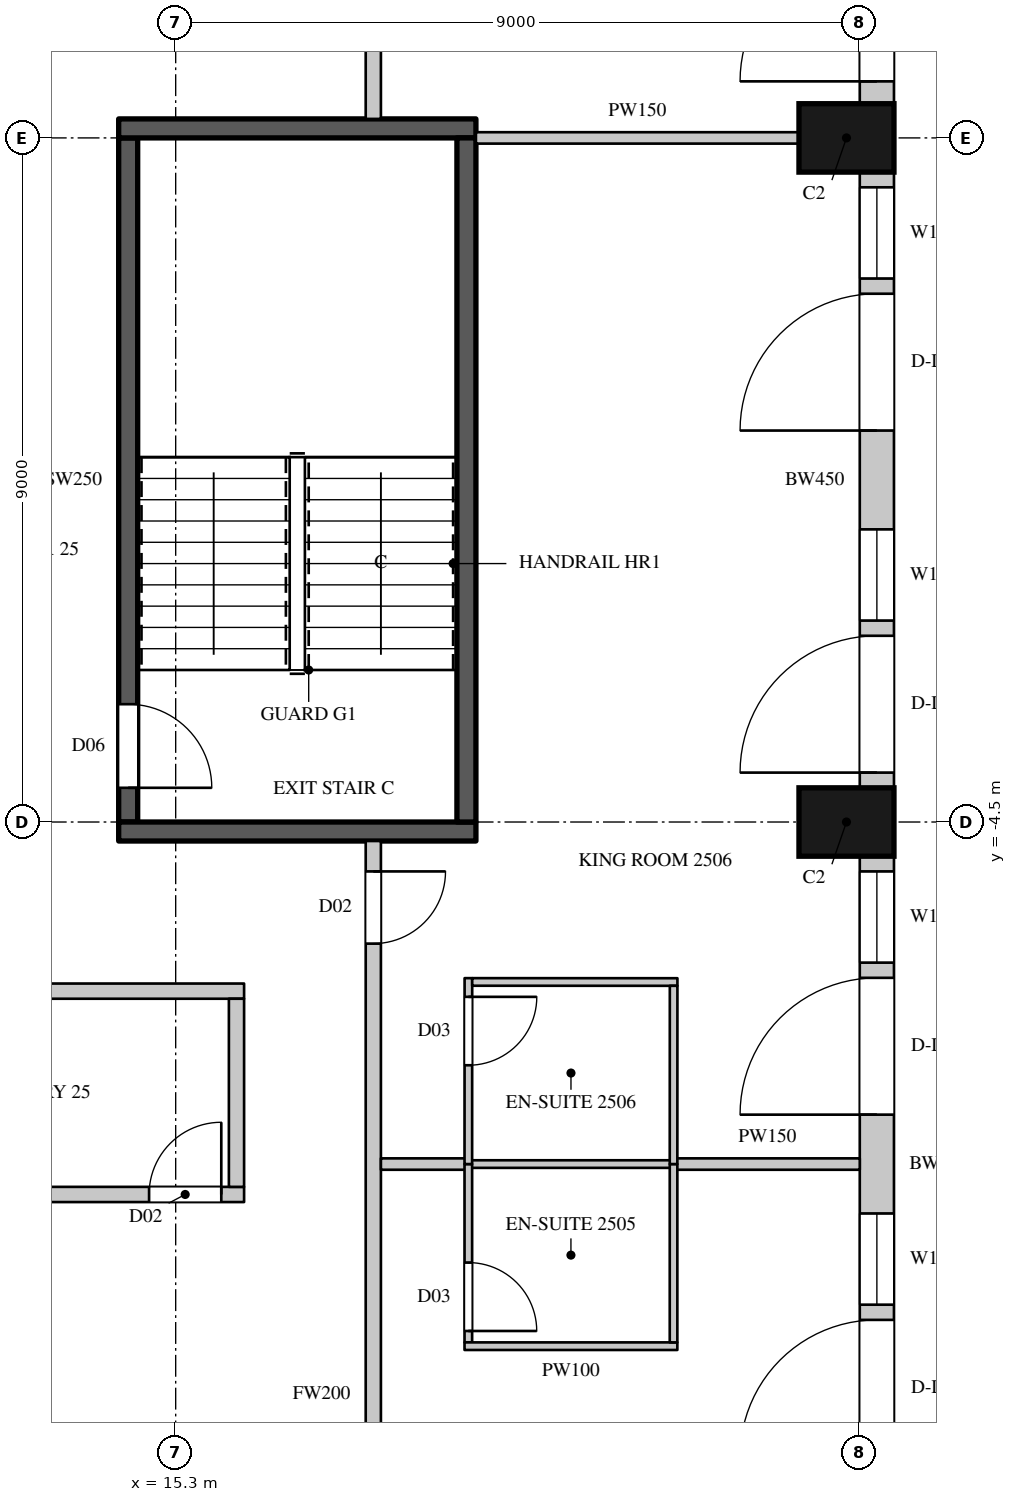
"""IFC4 building model, lengths in metres.
Left out: names, types, materials, properties, quantities, classifications, styles, units other than length and angle.
Written with IfcOpenShell. Run it as: python <this file> out.ifc"""

import sys

from ifc_helpers import new_model, si_unit, direction, frame, frame_2d, origin, origin_2d, place, context, subcontext, project, spatial, rectangle, extrude, element, fill, save


model = new_model("IFC4")
c1 = context("Model", 3, precision=1e-05, world=origin(), true_north=direction((0.0, 1.0)))
c2 = subcontext(c1, "Body", "Model", "MODEL_VIEW")
j1 = project(units=[si_unit("LENGTHUNIT", "METRE"), si_unit("PLANEANGLEUNIT", "RADIAN")], contexts=[c1])
p1 = place(None, origin())
s1 = spatial("IfcSite", under=j1, at=p1, CompositionType="ELEMENT")
p2 = place(p1, origin())
s2 = spatial("IfcBuilding", under=s1, at=p2, CompositionType="ELEMENT")
p3 = place(p2, frame((0.0, 0.0, 120.3)))
s3 = spatial("IfcBuildingStorey", under=s2, at=p3, CompositionType="ELEMENT", Elevation=120.3)
for number, where, z_axis, x_axis in (
    (1, (24.125, -4.5, 0.0), (0.0, 0.0, 1.0), (0.0, 1.0, 0.0)),
    (2, (24.125, 4.5, 0.0), (0.0, 0.0, 1.0), (0.0, 1.0, 0.0)),
):
    element("IfcColumn", number, at=place(p3, frame(where, z_axis=z_axis, x_axis=x_axis)), inside=s3, PredefinedType="COLUMN", context=c2, shape_type="SweptSolid", body=[
        extrude(rectangle(XDim=0.9, YDim=1.25, at=origin_2d()), origin(), (0.0, 0.0, 1.0), 3.6),
    ])
p4 = place(p3, frame((24.525, -13.05, 0.0), z_axis=(0.0, 0.0, 1.0), x_axis=(0.0, 1.0, 0.0)))
e3 = element("IfcWall", 3, at=p4, inside=s3, PredefinedType="SOLIDWALL", context=c2, shape_type="SweptSolid", body=[
    extrude(rectangle(XDim=8.1, YDim=0.45, at=frame_2d((4.05, 0.0))), origin(), (0.0, 0.0, 1.0), 3.3),
])
p5 = place(p4, frame((0.2, 0.0, 0.0)))
e4 = element("IfcOpeningElement", 4, at=p5, cuts=e3, PredefinedType="OPENING", context=c2, shape_type="SweptSolid", body=[
    extrude(rectangle(XDim=1.8, YDim=2.4, at=frame_2d((0.9, 1.2))), frame((0.0, 0.235, 0.0), z_axis=(0.0, -1.0, 0.0), x_axis=(1.0, 0.0, 0.0)), (0.0, 0.0, 1.0), 0.47),
])
p6 = place(p4, frame((2.2, 0.0, 1.05)))
e5 = element("IfcOpeningElement", 5, at=p6, cuts=e3, PredefinedType="OPENING", context=c2, shape_type="SweptSolid", body=[
    extrude(rectangle(XDim=1.2, YDim=2.0, at=frame_2d((0.6, 1.0))), frame((0.0, 0.235, 0.0), z_axis=(0.0, -1.0, 0.0), x_axis=(1.0, 0.0, 0.0)), (0.0, 0.0, 1.0), 0.47),
])
p7 = place(p4, frame((4.7, 0.0, 0.0)))
e6 = element("IfcOpeningElement", 6, at=p7, cuts=e3, PredefinedType="OPENING", context=c2, shape_type="SweptSolid", body=[
    extrude(rectangle(XDim=1.8, YDim=2.4, at=frame_2d((0.9, 1.2))), frame((0.0, 0.235, 0.0), z_axis=(0.0, -1.0, 0.0), x_axis=(1.0, 0.0, 0.0)), (0.0, 0.0, 1.0), 0.47),
])
p8 = place(p4, frame((6.7, 0.0, 1.05)))
e7 = element("IfcOpeningElement", 7, at=p8, cuts=e3, PredefinedType="OPENING", context=c2, shape_type="SweptSolid", body=[
    extrude(rectangle(XDim=1.2, YDim=2.0, at=frame_2d((0.6, 1.0))), frame((0.0, 0.235, 0.0), z_axis=(0.0, -1.0, 0.0), x_axis=(1.0, 0.0, 0.0)), (0.0, 0.0, 1.0), 0.47),
])
p9 = place(p3, frame((24.525, -4.05, 0.0), z_axis=(0.0, 0.0, 1.0), x_axis=(0.0, 1.0, 0.0)))
e8 = element("IfcWall", 8, at=p9, inside=s3, PredefinedType="SOLIDWALL", context=c2, shape_type="SweptSolid", body=[
    extrude(rectangle(XDim=8.1, YDim=0.45, at=frame_2d((4.05, 0.0))), origin(), (0.0, 0.0, 1.0), 3.3),
])
p10 = place(p9, frame((0.2, 0.0, 0.0)))
e9 = element("IfcOpeningElement", 9, at=p10, cuts=e8, PredefinedType="OPENING", context=c2, shape_type="SweptSolid", body=[
    extrude(rectangle(XDim=1.8, YDim=2.4, at=frame_2d((0.9, 1.2))), frame((0.0, 0.235, 0.0), z_axis=(0.0, -1.0, 0.0), x_axis=(1.0, 0.0, 0.0)), (0.0, 0.0, 1.0), 0.47),
])
p11 = place(p9, frame((2.2, 0.0, 1.05)))
e10 = element("IfcOpeningElement", 10, at=p11, cuts=e8, PredefinedType="OPENING", context=c2, shape_type="SweptSolid", body=[
    extrude(rectangle(XDim=1.2, YDim=2.0, at=frame_2d((0.6, 1.0))), frame((0.0, 0.235, 0.0), z_axis=(0.0, -1.0, 0.0), x_axis=(1.0, 0.0, 0.0)), (0.0, 0.0, 1.0), 0.47),
])
p12 = place(p9, frame((4.7, 0.0, 0.0)))
e11 = element("IfcOpeningElement", 11, at=p12, cuts=e8, PredefinedType="OPENING", context=c2, shape_type="SweptSolid", body=[
    extrude(rectangle(XDim=1.8, YDim=2.4, at=frame_2d((0.9, 1.2))), frame((0.0, 0.235, 0.0), z_axis=(0.0, -1.0, 0.0), x_axis=(1.0, 0.0, 0.0)), (0.0, 0.0, 1.0), 0.47),
])
p13 = place(p9, frame((6.7, 0.0, 1.05)))
e12 = element("IfcOpeningElement", 12, at=p13, cuts=e8, PredefinedType="OPENING", context=c2, shape_type="SweptSolid", body=[
    extrude(rectangle(XDim=1.2, YDim=2.0, at=frame_2d((0.6, 1.0))), frame((0.0, 0.235, 0.0), z_axis=(0.0, -1.0, 0.0), x_axis=(1.0, 0.0, 0.0)), (0.0, 0.0, 1.0), 0.47),
])
p14 = place(p3, frame((24.525, 4.95, 0.0), z_axis=(0.0, 0.0, 1.0), x_axis=(0.0, 1.0, 0.0)))
e13 = element("IfcWall", 13, at=p14, inside=s3, PredefinedType="SOLIDWALL", context=c2, shape_type="SweptSolid", body=[
    extrude(rectangle(XDim=8.439, YDim=0.45, at=frame_2d((4.219, 0.0))), origin(), (0.0, 0.0, 1.0), 3.3),
])
p15 = place(p14, frame((0.294, 0.0, 0.0)))
e14 = element("IfcOpeningElement", 14, at=p15, cuts=e13, PredefinedType="OPENING", context=c2, shape_type="SweptSolid", body=[
    extrude(rectangle(XDim=1.8, YDim=2.4, at=frame_2d((0.9, 1.2))), frame((0.0, 0.235, 0.0), z_axis=(0.0, -1.0, 0.0), x_axis=(1.0, 0.0, 0.0)), (0.0, 0.0, 1.0), 0.47),
])
p16 = place(p14, frame((2.294, 0.0, 1.05)))
e15 = element("IfcOpeningElement", 15, at=p16, cuts=e13, PredefinedType="OPENING", context=c2, shape_type="SweptSolid", body=[
    extrude(rectangle(XDim=1.2, YDim=2.0, at=frame_2d((0.6, 1.0))), frame((0.0, 0.235, 0.0), z_axis=(0.0, -1.0, 0.0), x_axis=(1.0, 0.0, 0.0)), (0.0, 0.0, 1.0), 0.47),
])
p17 = place(p14, frame((5.232, 0.0, 1.05)))
e16 = element("IfcOpeningElement", 16, at=p17, cuts=e13, PredefinedType="OPENING", context=c2, shape_type="SweptSolid", body=[
    extrude(rectangle(XDim=2.7, YDim=2.0, at=frame_2d((1.35, 1.0))), frame((0.0, 0.235, 0.0), z_axis=(0.0, -1.0, 0.0), x_axis=(1.0, 0.0, 0.0)), (0.0, 0.0, 1.0), 0.47),
])
p18 = place(p3, frame((10.9, -9.4, 0.0), z_axis=(0.0, 0.0, 1.0), x_axis=(1.0, 0.0, 0.0)))
e17 = element("IfcWall", 17, at=p18, inside=s3, PredefinedType="PARTITIONING", context=c2, shape_type="SweptSolid", body=[
    extrude(rectangle(XDim=5.3, YDim=0.2, at=frame_2d((2.65, 0.0))), origin(), (0.0, 0.0, 1.0), 3.3),
])
p19 = place(p18, frame((4.05, 0.0, 0.0)))
e18 = element("IfcOpeningElement", 18, at=p19, cuts=e17, PredefinedType="OPENING", context=c2, shape_type="SweptSolid", body=[
    extrude(rectangle(XDim=0.95, YDim=2.2, at=frame_2d((0.475, 1.1))), frame((0.0, 0.11, 0.0), z_axis=(0.0, -1.0, 0.0), x_axis=(1.0, 0.0, 0.0)), (0.0, 0.0, 1.0), 0.22),
])
p20 = place(p3, frame((10.9, -6.725, 0.0), z_axis=(0.0, 0.0, 1.0), x_axis=(1.0, 0.0, 0.0)))
e19 = element("IfcWall", 19, at=p20, inside=s3, PredefinedType="PARTITIONING", context=c2, shape_type="SweptSolid", body=[
    extrude(rectangle(XDim=5.3, YDim=0.2, at=frame_2d((2.65, 0.0))), origin(), (0.0, 0.0, 1.0), 3.3),
])
p21 = place(p3, frame((16.1, -9.3, 0.0), z_axis=(0.0, 0.0, 1.0), x_axis=(0.0, 1.0, 0.0)))
e20 = element("IfcWall", 20, at=p21, inside=s3, PredefinedType="PARTITIONING", context=c2, shape_type="SweptSolid", body=[
    extrude(rectangle(XDim=2.475, YDim=0.2, at=frame_2d((1.238, 0.0))), origin(), (0.0, 0.0, 1.0), 3.3),
])
p22 = place(p3, frame((17.9, -19.3, 0.0), z_axis=(0.0, 0.0, 1.0), x_axis=(0.0, 1.0, 0.0)))
e21 = element("IfcWall", 21, at=p22, inside=s3, PredefinedType="PARTITIONING", context=c2, shape_type="SweptSolid", body=[
    extrude(rectangle(XDim=14.55, YDim=0.2, at=frame_2d((7.275, 0.0))), origin(), (0.0, 0.0, 1.0), 3.3),
])
p23 = place(p22, frame((3.7, 0.0, 0.0)))
e22 = element("IfcOpeningElement", 22, at=p23, cuts=e21, PredefinedType="OPENING", context=c2, shape_type="SweptSolid", body=[
    extrude(rectangle(XDim=0.95, YDim=2.2, at=frame_2d((0.475, 1.1))), frame((0.0, 0.11, 0.0), z_axis=(0.0, -1.0, 0.0), x_axis=(1.0, 0.0, 0.0)), (0.0, 0.0, 1.0), 0.22),
])
p24 = place(p22, frame((13.2, 0.0, 0.0)))
e23 = element("IfcOpeningElement", 23, at=p24, cuts=e21, PredefinedType="OPENING", context=c2, shape_type="SweptSolid", body=[
    extrude(rectangle(XDim=0.95, YDim=2.2, at=frame_2d((0.475, 1.1))), frame((0.0, 0.11, 0.0), z_axis=(0.0, -1.0, 0.0), x_axis=(1.0, 0.0, 0.0)), (0.0, 0.0, 1.0), 0.22),
])
p25 = place(p3, frame((17.9, 4.75, 0.0), z_axis=(0.0, 0.0, 1.0), x_axis=(0.0, 1.0, 0.0)))
e24 = element("IfcWall", 24, at=p25, inside=s3, PredefinedType="PARTITIONING", context=c2, shape_type="SweptSolid", body=[
    extrude(rectangle(XDim=14.314, YDim=0.2, at=frame_2d((7.157, 0.0))), origin(), (0.0, 0.0, 1.0), 3.3),
])
p26 = place(p25, frame((1.7, 0.0, 0.0)))
e25 = element("IfcOpeningElement", 25, at=p26, cuts=e24, PredefinedType="OPENING", context=c2, shape_type="SweptSolid", body=[
    extrude(rectangle(XDim=0.9, YDim=2.2, at=frame_2d((0.45, 1.1))), frame((0.0, 0.11, 0.0), z_axis=(0.0, -1.0, 0.0), x_axis=(1.0, 0.0, 0.0)), (0.0, 0.0, 1.0), 0.22),
])
p27 = place(p25, frame((10.2, 0.0, 0.0)))
e26 = element("IfcOpeningElement", 26, at=p27, cuts=e24, PredefinedType="OPENING", context=c2, shape_type="SweptSolid", body=[
    extrude(rectangle(XDim=0.95, YDim=2.2, at=frame_2d((0.475, 1.1))), frame((0.0, 0.11, 0.0), z_axis=(0.0, -1.0, 0.0), x_axis=(1.0, 0.0, 0.0)), (0.0, 0.0, 1.0), 0.22),
])
p28 = place(p3, frame((18.0, -9.0, 0.0), z_axis=(0.0, 0.0, 1.0), x_axis=(1.0, 0.0, 0.0)))
e27 = element("IfcWall", 27, at=p28, inside=s3, PredefinedType="PARTITIONING", context=c2, shape_type="SweptSolid", body=[
    extrude(rectangle(XDim=1.13, YDim=0.15, at=frame_2d((0.565, 0.0))), origin(), (0.0, 0.0, 1.0), 2.65),
])
p29 = place(p3, frame((19.25, 4.5, 0.0), z_axis=(0.0, 0.0, 1.0), x_axis=(1.0, 0.0, 0.0)))
e28 = element("IfcWall", 28, at=p29, inside=s3, PredefinedType="PARTITIONING", context=c2, shape_type="SweptSolid", body=[
    extrude(rectangle(XDim=4.25, YDim=0.15, at=frame_2d((2.125, 0.0))), origin(), (0.0, 0.0, 1.0), 3.3),
])
p30 = place(p3, frame((21.87, -9.0, 0.0), z_axis=(0.0, 0.0, 1.0), x_axis=(1.0, 0.0, 0.0)))
e29 = element("IfcWall", 29, at=p30, inside=s3, PredefinedType="PARTITIONING", context=c2, shape_type="SweptSolid", body=[
    extrude(rectangle(XDim=2.43, YDim=0.15, at=frame_2d((1.215, 0.0))), origin(), (0.0, 0.0, 1.0), 2.65),
])
p31 = place(p3, frame((14.675, -4.5, 0.0), z_axis=(0.0, 0.0, 1.0), x_axis=(0.0, 1.0, 0.0)))
e30 = element("IfcWall", 30, at=p31, inside=s3, PredefinedType="SHEAR", context=c2, shape_type="SweptSolid", body=[
    extrude(rectangle(XDim=9.0, YDim=0.25, at=frame_2d((4.5, 0.0))), origin(), (0.0, 0.0, 1.0), 3.3),
])
p32 = place(p31, frame((0.45, 0.0, 0.0)))
e31 = element("IfcOpeningElement", 31, at=p32, cuts=e30, PredefinedType="OPENING", context=c2, shape_type="SweptSolid", body=[
    extrude(rectangle(XDim=1.1, YDim=2.2, at=frame_2d((0.55, 1.1))), frame((0.0, 0.135, 0.0), z_axis=(0.0, -1.0, 0.0), x_axis=(1.0, 0.0, 0.0)), (0.0, 0.0, 1.0), 0.27),
])
for number, where, z_axis, x_axis in (
    (32, (14.55, -4.625, 0.0), (0.0, 0.0, 1.0), (1.0, 0.0, 0.0)),
    (33, (14.55, 4.625, 0.0), (0.0, 0.0, 1.0), (1.0, 0.0, 0.0)),
):
    element("IfcWall", number, at=place(p3, frame(where, z_axis=z_axis, x_axis=x_axis)), inside=s3, PredefinedType="SHEAR", context=c2, shape_type="SweptSolid", body=[
        extrude(rectangle(XDim=4.7, YDim=0.25, at=frame_2d((2.35, 0.0))), origin(), (0.0, 0.0, 1.0), 3.3),
    ])
p33 = place(p3, frame((19.125, -4.5, 0.0), z_axis=(0.0, 0.0, 1.0), x_axis=(0.0, 1.0, 0.0)))
e34 = element("IfcWall", 34, at=p33, inside=s3, PredefinedType="SHEAR", context=c2, shape_type="SweptSolid", body=[
    extrude(rectangle(XDim=9.0, YDim=0.25, at=frame_2d((4.5, 0.0))), origin(), (0.0, 0.0, 1.0), 3.3),
])
p34 = place(p3, frame((19.13, -9.0, 0.0), z_axis=(0.0, 0.0, 1.0), x_axis=(1.0, 0.0, 0.0)))
e35 = element("IfcWall", 35, at=p34, inside=s3, PredefinedType="PARTITIONING", context=c2, shape_type="SweptSolid", body=[
    extrude(rectangle(XDim=2.74, YDim=0.1, at=frame_2d((1.37, 0.0))), origin(), (0.0, 0.0, 1.0), 2.65),
])
p35 = place(p3, frame((19.15, -11.346, 0.0), z_axis=(0.0, 0.0, 1.0), x_axis=(0.0, 1.0, 0.0)))
e36 = element("IfcWall", 36, at=p35, inside=s3, PredefinedType="PARTITIONING", context=c2, shape_type="SweptSolid", body=[
    extrude(rectangle(XDim=2.346, YDim=0.1, at=frame_2d((1.173, 0.0))), origin(), (0.0, 0.0, 1.0), 3.3),
])
p36 = place(p35, frame((0.15, 0.0, 0.0)))
e37 = element("IfcOpeningElement", 37, at=p36, cuts=e36, PredefinedType="OPENING", context=c2, shape_type="SweptSolid", body=[
    extrude(rectangle(XDim=0.9, YDim=2.2, at=frame_2d((0.45, 1.1))), frame((0.0, 0.06, 0.0), z_axis=(0.0, -1.0, 0.0), x_axis=(1.0, 0.0, 0.0)), (0.0, 0.0, 1.0), 0.12),
])
p37 = place(p3, frame((19.1, -11.396, 0.0), z_axis=(0.0, 0.0, 1.0), x_axis=(1.0, 0.0, 0.0)))
e38 = element("IfcWall", 38, at=p37, inside=s3, PredefinedType="PARTITIONING", context=c2, shape_type="SweptSolid", body=[
    extrude(rectangle(XDim=2.8, YDim=0.1, at=frame_2d((1.4, 0.0))), origin(), (0.0, 0.0, 1.0), 3.3),
])
p38 = place(p3, frame((19.15, -9.0, 0.0), z_axis=(0.0, 0.0, 1.0), x_axis=(0.000499051739, 0.999999875474, 0.0)))
e39 = element("IfcWall", 39, at=p38, inside=s3, PredefinedType="PARTITIONING", context=c2, shape_type="SweptSolid", body=[
    extrude(rectangle(XDim=2.446, YDim=0.1, at=frame_2d((1.223, 0.0))), origin(), (0.0, 0.0, 1.0), 3.3),
])
p39 = place(p38, frame((1.3, 0.0, 0.0)))
e40 = element("IfcOpeningElement", 40, at=p39, cuts=e39, PredefinedType="OPENING", context=c2, shape_type="SweptSolid", body=[
    extrude(rectangle(XDim=0.9, YDim=2.2, at=frame_2d((0.45, 1.1))), frame((0.0, 0.06, 0.0), z_axis=(0.0, -1.0, 0.0), x_axis=(1.0, 0.0, 0.0)), (0.0, 0.0, 1.0), 0.12),
])
p40 = place(p3, frame((19.201, -6.604, 0.0), z_axis=(0.0, 0.0, 1.0), x_axis=(0.999999934588, -0.000361696332, 0.0)))
e41 = element("IfcWall", 41, at=p40, inside=s3, PredefinedType="PARTITIONING", context=c2, shape_type="SweptSolid", body=[
    extrude(rectangle(XDim=2.7, YDim=0.1, at=frame_2d((1.35, 0.0))), origin(), (0.0, 0.0, 1.0), 3.3),
])
p41 = place(p3, frame((21.85, -11.346, 0.0), z_axis=(0.0, 0.0, 1.0), x_axis=(0.0, 1.0, 0.0)))
e42 = element("IfcWall", 42, at=p41, inside=s3, PredefinedType="PARTITIONING", context=c2, shape_type="SweptSolid", body=[
    extrude(rectangle(XDim=2.346, YDim=0.1, at=frame_2d((1.173, 0.0))), origin(), (0.0, 0.0, 1.0), 3.3),
])
p42 = place(p3, frame((21.85, -9.0, 0.0), z_axis=(0.0, 0.0, 1.0), x_axis=(0.00041644973, 0.999999913285, 0.0)))
e43 = element("IfcWall", 43, at=p42, inside=s3, PredefinedType="PARTITIONING", context=c2, shape_type="SweptSolid", body=[
    extrude(rectangle(XDim=2.345, YDim=0.1, at=frame_2d((1.172, 0.0))), origin(), (0.0, 0.0, 1.0), 3.3),
])
p43 = place(p5, origin())
e44 = element("IfcDoor", 44, at=p43, inside=s3, OperationType="SLIDING_TO_LEFT", PredefinedType="DOOR", context=c2, shape_type="SweptSolid", body=[
    extrude(rectangle(XDim=1.8, YDim=2.4, at=frame_2d((0.9, 1.2))), frame((0.0, 0.13, 0.0), z_axis=(0.0, -1.0, 0.0), x_axis=(1.0, 0.0, 0.0)), (0.0, 0.0, 1.0), 0.05),
])
fill(e4, e44)
p44 = place(p6, origin())
e45 = element("IfcWindow", 45, at=p44, inside=s3, PartitioningType="SINGLE_PANEL", PredefinedType="WINDOW", context=c2, shape_type="SweptSolid", body=[
    extrude(rectangle(XDim=1.2, YDim=2.0, at=frame_2d((0.6, 1.0))), frame((0.0, 0.135, 0.0), z_axis=(0.0, -1.0, 0.0), x_axis=(1.0, 0.0, 0.0)), (0.0, 0.0, 1.0), 0.06),
])
fill(e5, e45)
p45 = place(p7, origin())
e46 = element("IfcDoor", 46, at=p45, inside=s3, OperationType="SLIDING_TO_LEFT", PredefinedType="DOOR", context=c2, shape_type="SweptSolid", body=[
    extrude(rectangle(XDim=1.8, YDim=2.4, at=frame_2d((0.9, 1.2))), frame((0.0, 0.13, 0.0), z_axis=(0.0, -1.0, 0.0), x_axis=(1.0, 0.0, 0.0)), (0.0, 0.0, 1.0), 0.05),
])
fill(e6, e46)
p46 = place(p8, origin())
e47 = element("IfcWindow", 47, at=p46, inside=s3, PartitioningType="SINGLE_PANEL", PredefinedType="WINDOW", context=c2, shape_type="SweptSolid", body=[
    extrude(rectangle(XDim=1.2, YDim=2.0, at=frame_2d((0.6, 1.0))), frame((0.0, 0.135, 0.0), z_axis=(0.0, -1.0, 0.0), x_axis=(1.0, 0.0, 0.0)), (0.0, 0.0, 1.0), 0.06),
])
fill(e7, e47)
p47 = place(p10, origin())
e48 = element("IfcDoor", 48, at=p47, inside=s3, OperationType="SLIDING_TO_LEFT", PredefinedType="DOOR", context=c2, shape_type="SweptSolid", body=[
    extrude(rectangle(XDim=1.8, YDim=2.4, at=frame_2d((0.9, 1.2))), frame((0.0, 0.13, 0.0), z_axis=(0.0, -1.0, 0.0), x_axis=(1.0, 0.0, 0.0)), (0.0, 0.0, 1.0), 0.05),
])
fill(e9, e48)
p48 = place(p11, origin())
e49 = element("IfcWindow", 49, at=p48, inside=s3, PartitioningType="SINGLE_PANEL", PredefinedType="WINDOW", context=c2, shape_type="SweptSolid", body=[
    extrude(rectangle(XDim=1.2, YDim=2.0, at=frame_2d((0.6, 1.0))), frame((0.0, 0.135, 0.0), z_axis=(0.0, -1.0, 0.0), x_axis=(1.0, 0.0, 0.0)), (0.0, 0.0, 1.0), 0.06),
])
fill(e10, e49)
p49 = place(p12, origin())
e50 = element("IfcDoor", 50, at=p49, inside=s3, OperationType="SLIDING_TO_LEFT", PredefinedType="DOOR", context=c2, shape_type="SweptSolid", body=[
    extrude(rectangle(XDim=1.8, YDim=2.4, at=frame_2d((0.9, 1.2))), frame((0.0, 0.13, 0.0), z_axis=(0.0, -1.0, 0.0), x_axis=(1.0, 0.0, 0.0)), (0.0, 0.0, 1.0), 0.05),
])
fill(e11, e50)
p50 = place(p13, origin())
e51 = element("IfcWindow", 51, at=p50, inside=s3, PartitioningType="SINGLE_PANEL", PredefinedType="WINDOW", context=c2, shape_type="SweptSolid", body=[
    extrude(rectangle(XDim=1.2, YDim=2.0, at=frame_2d((0.6, 1.0))), frame((0.0, 0.135, 0.0), z_axis=(0.0, -1.0, 0.0), x_axis=(1.0, 0.0, 0.0)), (0.0, 0.0, 1.0), 0.06),
])
fill(e12, e51)
p51 = place(p15, origin())
e52 = element("IfcDoor", 52, at=p51, inside=s3, OperationType="SLIDING_TO_LEFT", PredefinedType="DOOR", context=c2, shape_type="SweptSolid", body=[
    extrude(rectangle(XDim=1.8, YDim=2.4, at=frame_2d((0.9, 1.2))), frame((0.0, 0.13, 0.0), z_axis=(0.0, -1.0, 0.0), x_axis=(1.0, 0.0, 0.0)), (0.0, 0.0, 1.0), 0.05),
])
fill(e14, e52)
p52 = place(p19, origin())
e53 = element("IfcDoor", 53, at=p52, inside=s3, OperationType="SINGLE_SWING_RIGHT", PredefinedType="DOOR", context=c2, shape_type="SweptSolid", body=[
    extrude(rectangle(XDim=0.95, YDim=2.2, at=frame_2d((0.475, 1.1))), frame((0.0, 0.025, 0.0), z_axis=(0.0, -1.0, 0.0), x_axis=(1.0, 0.0, 0.0)), (0.0, 0.0, 1.0), 0.05),
])
fill(e18, e53)
p53 = place(p36, origin())
e54 = element("IfcDoor", 54, at=p53, inside=s3, OperationType="SINGLE_SWING_RIGHT", PredefinedType="DOOR", context=c2, shape_type="SweptSolid", body=[
    extrude(rectangle(XDim=0.9, YDim=2.2, at=frame_2d((0.45, 1.1))), frame((0.0, 0.025, 0.0), z_axis=(0.0, -1.0, 0.0), x_axis=(1.0, 0.0, 0.0)), (0.0, 0.0, 1.0), 0.05),
])
fill(e37, e54)
p54 = place(p24, origin())
e55 = element("IfcDoor", 55, at=p54, inside=s3, OperationType="SINGLE_SWING_LEFT", PredefinedType="DOOR", context=c2, shape_type="SweptSolid", body=[
    extrude(rectangle(XDim=0.95, YDim=2.2, at=frame_2d((0.475, 1.1))), frame((0.0, 0.025, 0.0), z_axis=(0.0, -1.0, 0.0), x_axis=(1.0, 0.0, 0.0)), (0.0, 0.0, 1.0), 0.05),
])
fill(e23, e55)
p55 = place(p39, origin())
e56 = element("IfcDoor", 56, at=p55, inside=s3, OperationType="SINGLE_SWING_LEFT", PredefinedType="DOOR", context=c2, shape_type="SweptSolid", body=[
    extrude(rectangle(XDim=0.9, YDim=2.2, at=frame_2d((0.45, 1.1))), frame((0.0, 0.025, 0.0), z_axis=(0.0, -1.0, 0.0), x_axis=(1.0, 0.0, 0.0)), (0.0, 0.0, 1.0), 0.05),
])
fill(e40, e56)
p56 = place(p32, origin())
e57 = element("IfcDoor", 57, at=p56, inside=s3, OperationType="SINGLE_SWING_RIGHT", PredefinedType="DOOR", context=c2, shape_type="SweptSolid", body=[
    extrude(rectangle(XDim=1.1, YDim=2.2, at=frame_2d((0.55, 1.1))), frame((0.0, 0.025, 0.0), z_axis=(0.0, -1.0, 0.0), x_axis=(1.0, 0.0, 0.0)), (0.0, 0.0, 1.0), 0.05),
])
fill(e31, e57)
save(model, sys.argv[1])
